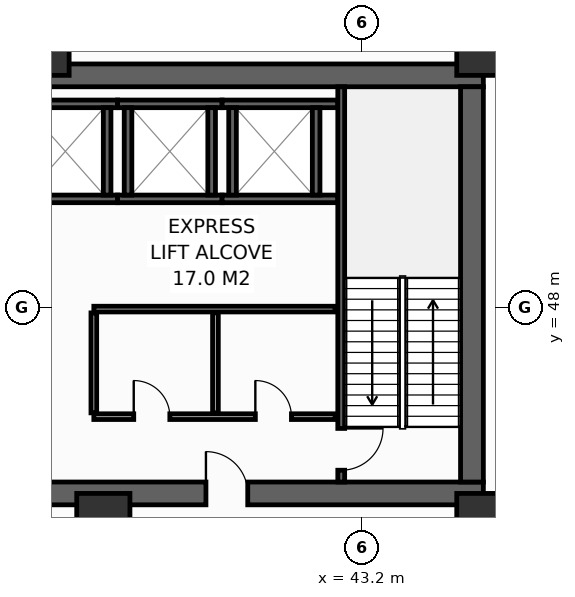
"""IFC4 building model, lengths in metres.
Left out: names, types, materials, properties, quantities, classifications, styles, units other than length and angle.
Written with IfcOpenShell. Run it as: python <this file> out.ifc"""

import sys

from ifc_helpers import new_model, si_unit, direction, frame, frame_2d, origin, origin_2d, place, context, subcontext, project, spatial, rectangle, hollow_rectangle, extrude, element, fill, save


model = new_model("IFC4")
c1 = context("Model", 3, precision=1e-05, world=origin(), true_north=direction((0.0, 1.0)))
c2 = subcontext(c1, "Body", "Model", "MODEL_VIEW")
j1 = project(units=[si_unit("LENGTHUNIT", "METRE"), si_unit("PLANEANGLEUNIT", "RADIAN")], contexts=[c1])
p1 = place(None, origin())
s1 = spatial("IfcSite", under=j1, at=p1, CompositionType="ELEMENT")
p2 = place(p1, origin())
s2 = spatial("IfcBuilding", under=s1, at=p2, CompositionType="ELEMENT")
p3 = place(p2, frame((0.0, 0.0, 22.2)))
s3 = spatial("IfcBuildingStorey", under=s2, at=p3, CompositionType="ELEMENT", Elevation=22.2)
p4 = place(p3, frame((13.5, 43.1, 0.0), z_axis=(0.0, 0.0, 1.0), x_axis=(1.0, 0.0, 0.0)))
e1 = element("IfcWall", 1, at=p4, inside=s3, PredefinedType="SHEAR", context=c2, shape_type="SweptSolid", body=[
    extrude(rectangle(XDim=32.9, YDim=0.6, at=frame_2d((16.45, 0.0))), origin(), (0.0, 0.0, 1.0), 5.15),
])
p5 = place(p4, frame((5.4, 0.0, 0.0)))
e2 = element("IfcOpeningElement", 2, at=p5, cuts=e1, PredefinedType="OPENING", context=c2, shape_type="SweptSolid", body=[
    extrude(rectangle(XDim=1.1, YDim=2.15, at=frame_2d((0.55, 1.075))), frame((0.0, 0.31, 0.0), z_axis=(0.0, -1.0, 0.0), x_axis=(1.0, 0.0, 0.0)), (0.0, 0.0, 1.0), 0.62),
])
p6 = place(p4, frame((25.6, 0.0, 0.0)))
e3 = element("IfcOpeningElement", 3, at=p6, cuts=e1, PredefinedType="OPENING", context=c2, shape_type="SweptSolid", body=[
    extrude(rectangle(XDim=1.1, YDim=2.15, at=frame_2d((0.55, 1.075))), frame((0.0, 0.31, 0.0), z_axis=(0.0, -1.0, 0.0), x_axis=(1.0, 0.0, 0.0)), (0.0, 0.0, 1.0), 0.62),
])
p7 = place(p3, frame((13.5, 54.1, 0.0), z_axis=(0.0, 0.0, 1.0), x_axis=(1.0, 0.0, 0.0)))
e4 = element("IfcWall", 4, at=p7, inside=s3, PredefinedType="SHEAR", context=c2, shape_type="SweptSolid", body=[
    extrude(rectangle(XDim=32.9, YDim=0.6, at=frame_2d((16.45, 0.0))), origin(), (0.0, 0.0, 1.0), 5.15),
])
p8 = place(p3, frame((46.1, 43.4, 0.0), z_axis=(0.0, 0.0, 1.0), x_axis=(0.0, 1.0, 0.0)))
e5 = element("IfcWall", 5, at=p8, inside=s3, PredefinedType="SHEAR", context=c2, shape_type="SweptSolid", body=[
    extrude(rectangle(XDim=10.4, YDim=0.6, at=frame_2d((5.2, 0.0))), origin(), (0.0, 0.0, 1.0), 5.15),
])
for number, where, z_axis, x_axis in (
    (6, (34.8, 54.8, 0.0), (0.0, 0.0, 1.0), (1.0, 0.0, 0.0)),
    (7, (46.4, 54.8, 0.0), (0.0, 0.0, 1.0), (1.0, 0.0, 0.0)),
    (8, (36.4, 42.4, 0.0), (0.0, 0.0, 1.0), (1.0, 0.0, 0.0)),
    (9, (46.4, 42.4, 0.0), (0.0, 0.0, 1.0), (1.0, 0.0, 0.0)),
):
    element("IfcColumn", number, at=place(p3, frame(where, z_axis=z_axis, x_axis=x_axis)), inside=s3, PredefinedType="COLUMN", context=c2, shape_type="SweptSolid", body=[
        extrude(hollow_rectangle(XDim=1.4, YDim=1.4, WallThickness=0.065, at=origin_2d()), origin(), (0.0, 0.0, 1.0), 5.4),
    ])
for number, where, z_axis, x_axis in (
    (10, (33.95, 50.85, 0.0), (0.0, 0.0, 1.0), (1.0, 0.0, 0.0)),
    (11, (33.95, 53.35, 0.0), (0.0, 0.0, 1.0), (1.0, 0.0, 0.0)),
):
    element("IfcWall", number, at=place(p3, frame(where, z_axis=z_axis, x_axis=x_axis)), inside=s3, PredefinedType="SHEAR", context=c2, shape_type="SweptSolid", body=[
        extrude(rectangle(XDim=2.825, YDim=0.2, at=frame_2d((1.413, 0.0))), origin(), (0.0, 0.0, 1.0), 5.15),
    ])
p9 = place(p3, frame((36.5, 50.95, 0.0), z_axis=(0.0, 0.0, 1.0), x_axis=(0.0, 1.0, 0.0)))
e12 = element("IfcWall", 12, at=p9, inside=s3, PredefinedType="SHEAR", context=c2, shape_type="SweptSolid", body=[
    extrude(rectangle(XDim=2.3, YDim=0.2, at=frame_2d((1.15, 0.0))), origin(), (0.0, 0.0, 1.0), 5.15),
])
for number, where, z_axis, x_axis in (
    (13, (36.775, 50.85, 0.0), (0.0, 0.0, 1.0), (1.0, 0.0, 0.0)),
    (14, (36.775, 53.35, 0.0), (0.0, 0.0, 1.0), (1.0, 0.0, 0.0)),
):
    element("IfcWall", number, at=place(p3, frame(where, z_axis=z_axis, x_axis=x_axis)), inside=s3, PredefinedType="SHEAR", context=c2, shape_type="SweptSolid", body=[
        extrude(rectangle(XDim=2.75, YDim=0.2, at=frame_2d((1.375, 0.0))), origin(), (0.0, 0.0, 1.0), 5.15),
    ])
for number, where, z_axis, x_axis in (
    (15, (37.05, 50.95, 0.0), (0.0, 0.0, 1.0), (0.0, 1.0, 0.0)),
    (16, (39.25, 50.95, 0.0), (0.0, 0.0, 1.0), (0.0, 1.0, 0.0)),
):
    element("IfcWall", number, at=place(p3, frame(where, z_axis=z_axis, x_axis=x_axis)), inside=s3, PredefinedType="SHEAR", context=c2, shape_type="SweptSolid", body=[
        extrude(rectangle(XDim=2.3, YDim=0.2, at=frame_2d((1.15, 0.0))), origin(), (0.0, 0.0, 1.0), 5.15),
    ])
for number, where, z_axis, x_axis in (
    (17, (39.525, 50.85, 0.0), (0.0, 0.0, 1.0), (1.0, 0.0, 0.0)),
    (18, (39.525, 53.35, 0.0), (0.0, 0.0, 1.0), (1.0, 0.0, 0.0)),
):
    element("IfcWall", number, at=place(p3, frame(where, z_axis=z_axis, x_axis=x_axis)), inside=s3, PredefinedType="SHEAR", context=c2, shape_type="SweptSolid", body=[
        extrude(rectangle(XDim=3.045, YDim=0.2, at=frame_2d((1.522, 0.0))), origin(), (0.0, 0.0, 1.0), 5.15),
    ])
for number, where, z_axis, x_axis in (
    (19, (39.8, 50.95, 0.0), (0.0, 0.0, 1.0), (0.0, 1.0, 0.0)),
    (20, (42.0, 50.95, 0.0), (0.0, 0.0, 1.0), (0.0, 1.0, 0.0)),
):
    element("IfcWall", number, at=place(p3, frame(where, z_axis=z_axis, x_axis=x_axis)), inside=s3, PredefinedType="SHEAR", context=c2, shape_type="SweptSolid", body=[
        extrude(rectangle(XDim=2.3, YDim=0.2, at=frame_2d((1.15, 0.0))), origin(), (0.0, 0.0, 1.0), 5.15),
    ])
p10 = place(p3, frame((42.66, 53.8, 0.0), z_axis=(0.0, 0.0, 1.0), x_axis=(0.0, -1.0, 0.0)))
e21 = element("IfcWall", 21, at=p10, inside=s3, PredefinedType="SHEAR", context=c2, shape_type="SweptSolid", body=[
    extrude(rectangle(XDim=10.4, YDim=0.18, at=frame_2d((5.2, 0.0))), origin(), (0.0, 0.0, 1.0), 5.15),
])
p11 = place(p10, frame((8.99, 0.0, 0.0)))
e22 = element("IfcOpeningElement", 22, at=p11, cuts=e21, PredefinedType="OPENING", context=c2, shape_type="SweptSolid", body=[
    extrude(rectangle(XDim=1.1, YDim=2.15, at=frame_2d((0.55, 1.075))), frame((0.0, 0.1, 0.0), z_axis=(0.0, -1.0, 0.0), x_axis=(1.0, 0.0, 0.0)), (0.0, 0.0, 1.0), 0.2),
])
p12 = place(p3, frame((36.15, 45.12, 0.0), z_axis=(0.0, 0.0, 1.0), x_axis=(1.0, 0.0, 0.0)))
e23 = element("IfcWall", 23, at=p12, inside=s3, PredefinedType="PARTITIONING", context=c2, shape_type="SweptSolid", body=[
    extrude(rectangle(XDim=6.35, YDim=0.15, at=frame_2d((3.175, 0.0))), origin(), (0.0, 0.0, 1.0), 5.15),
])
p13 = place(p12, frame((1.05, 0.0, 0.0)))
e24 = element("IfcOpeningElement", 24, at=p13, cuts=e23, PredefinedType="OPENING", context=c2, shape_type="SweptSolid", body=[
    extrude(rectangle(XDim=0.95, YDim=2.15, at=frame_2d((0.475, 1.075))), frame((0.0, 0.085, 0.0), z_axis=(0.0, -1.0, 0.0), x_axis=(1.0, 0.0, 0.0)), (0.0, 0.0, 1.0), 0.17),
])
p14 = place(p12, frame((4.25, 0.0, 0.0)))
e25 = element("IfcOpeningElement", 25, at=p14, cuts=e23, PredefinedType="OPENING", context=c2, shape_type="SweptSolid", body=[
    extrude(rectangle(XDim=0.95, YDim=2.15, at=frame_2d((0.475, 1.075))), frame((0.0, 0.085, 0.0), z_axis=(0.0, -1.0, 0.0), x_axis=(1.0, 0.0, 0.0)), (0.0, 0.0, 1.0), 0.17),
])
p15 = place(p3, frame((36.15, 47.95, 0.0), z_axis=(0.0, 0.0, 1.0), x_axis=(1.0, 0.0, 0.0)))
e26 = element("IfcWall", 26, at=p15, inside=s3, PredefinedType="PARTITIONING", context=c2, shape_type="SweptSolid", body=[
    extrude(rectangle(XDim=6.35, YDim=0.15, at=frame_2d((3.175, 0.0))), origin(), (0.0, 0.0, 1.0), 5.15),
])
for number, where, z_axis, x_axis in (
    (27, (36.15, 45.22, 0.0), (0.0, 0.0, 1.0), (0.0, 1.0, 0.0)),
    (28, (39.35, 45.22, 0.0), (0.0, 0.0, 1.0), (0.0, 1.0, 0.0)),
):
    element("IfcWall", number, at=place(p3, frame(where, z_axis=z_axis, x_axis=x_axis)), inside=s3, PredefinedType="PARTITIONING", context=c2, shape_type="SweptSolid", body=[
        extrude(rectangle(XDim=2.63, YDim=0.15, at=frame_2d((1.315, 0.0))), origin(), (0.0, 0.0, 1.0), 5.15),
    ])
p16 = place(p11, origin())
e29 = element("IfcDoor", 29, at=p16, inside=s3, OperationType="SINGLE_SWING_LEFT", PredefinedType="DOOR", context=c2, shape_type="SweptSolid", body=[
    extrude(rectangle(XDim=1.1, YDim=2.15, at=frame_2d((0.55, 1.075))), frame((0.0, 0.025, 0.0), z_axis=(0.0, -1.0, 0.0), x_axis=(1.0, 0.0, 0.0)), (0.0, 0.0, 1.0), 0.05),
])
fill(e22, e29)
p17 = place(p6, origin())
e30 = element("IfcDoor", 30, at=p17, inside=s3, OperationType="SINGLE_SWING_LEFT", PredefinedType="DOOR", context=c2, shape_type="SweptSolid", body=[
    extrude(rectangle(XDim=1.1, YDim=2.15, at=frame_2d((0.55, 1.075))), frame((0.0, 0.025, 0.0), z_axis=(0.0, -1.0, 0.0), x_axis=(1.0, 0.0, 0.0)), (0.0, 0.0, 1.0), 0.05),
])
fill(e3, e30)
p18 = place(p13, origin())
e31 = element("IfcDoor", 31, at=p18, inside=s3, OperationType="SINGLE_SWING_LEFT", PredefinedType="DOOR", context=c2, shape_type="SweptSolid", body=[
    extrude(rectangle(XDim=0.95, YDim=2.15, at=frame_2d((0.475, 1.075))), frame((0.0, 0.025, 0.0), z_axis=(0.0, -1.0, 0.0), x_axis=(1.0, 0.0, 0.0)), (0.0, 0.0, 1.0), 0.05),
])
fill(e24, e31)
p19 = place(p14, origin())
e32 = element("IfcDoor", 32, at=p19, inside=s3, OperationType="SINGLE_SWING_LEFT", PredefinedType="DOOR", context=c2, shape_type="SweptSolid", body=[
    extrude(rectangle(XDim=0.95, YDim=2.15, at=frame_2d((0.475, 1.075))), frame((0.0, 0.025, 0.0), z_axis=(0.0, -1.0, 0.0), x_axis=(1.0, 0.0, 0.0)), (0.0, 0.0, 1.0), 0.05),
])
fill(e25, e32)
save(model, sys.argv[1])
